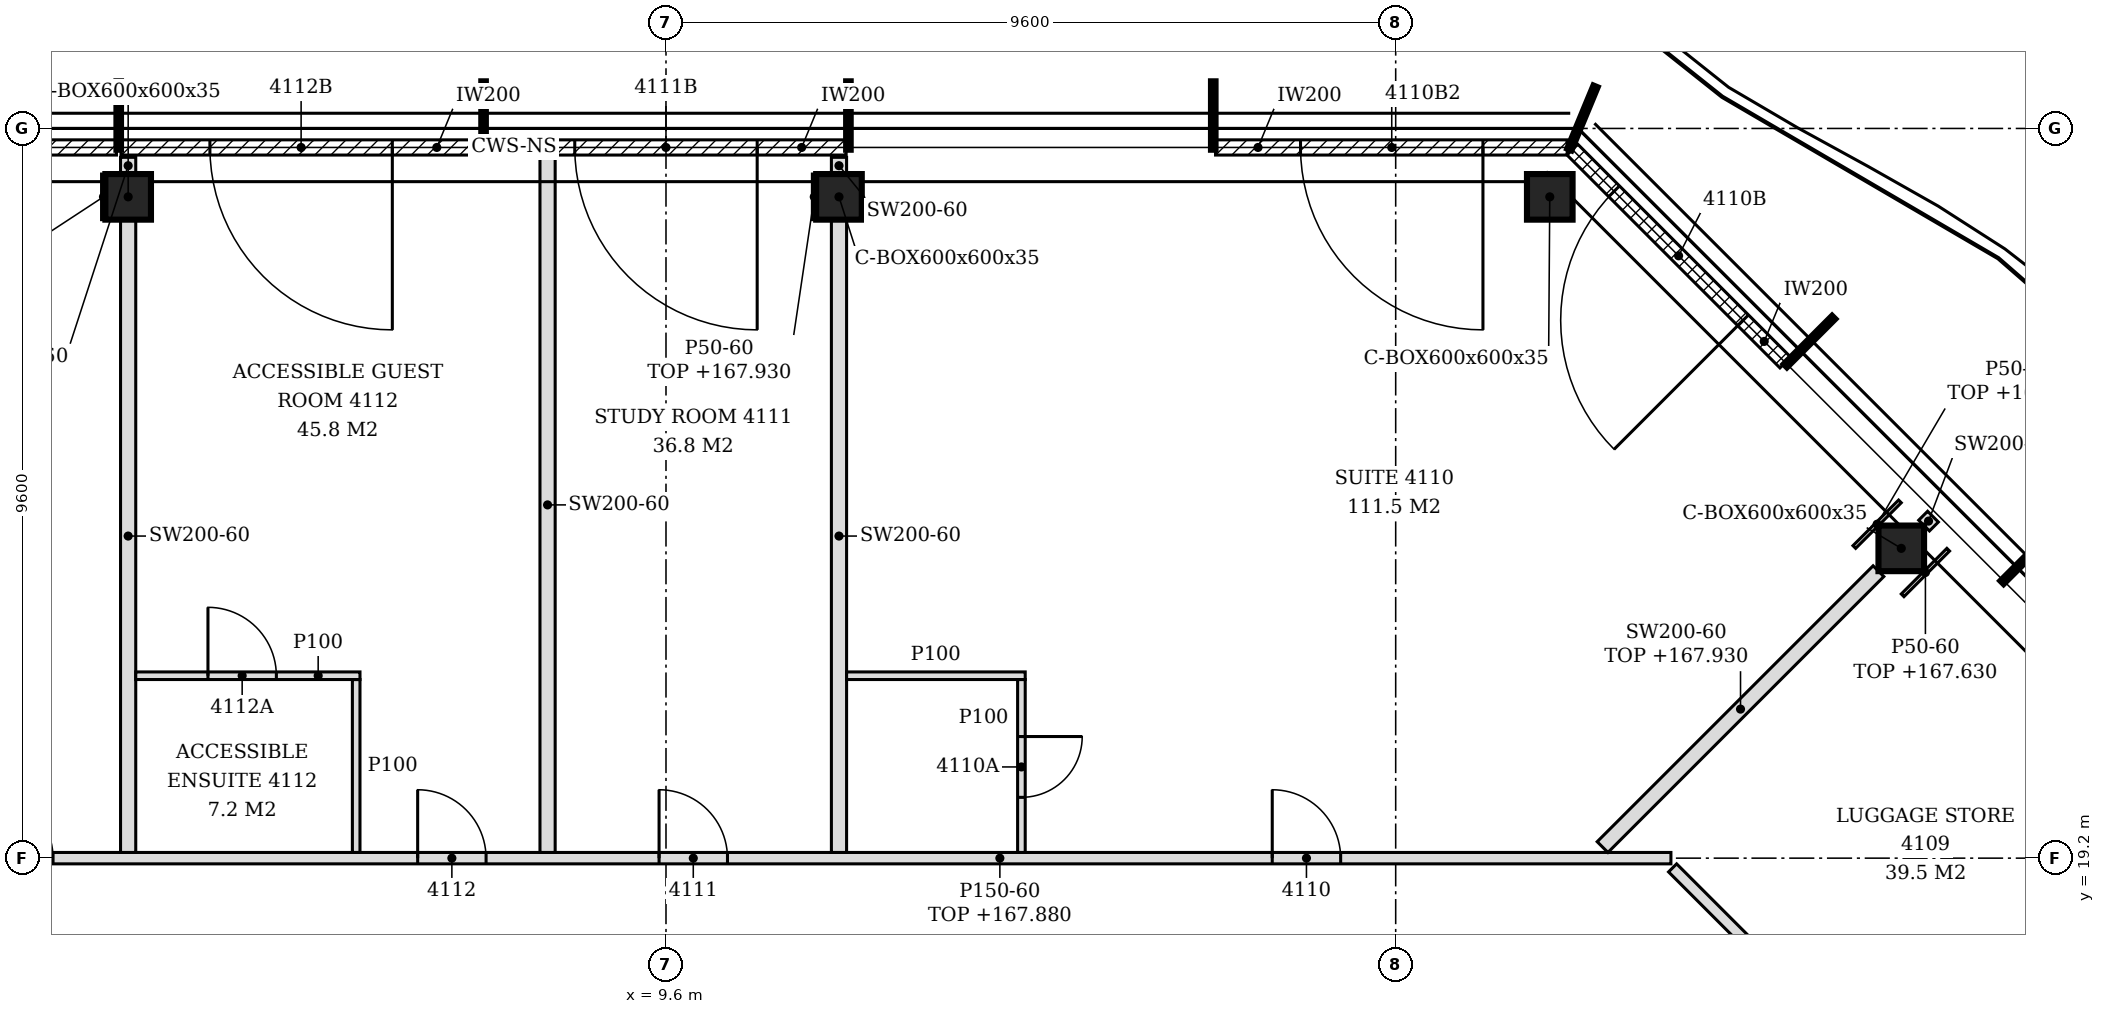
"""IFC4 building model, lengths in metres.
Left out: names, types, materials, properties, quantities, classifications, styles, units other than length and angle.
Written with IfcOpenShell. Run it as: python <this file> out.ifc"""

import sys

from ifc_helpers import new_model, si_unit, direction, frame, frame_2d, origin, origin_2d, place, context, subcontext, project, spatial, polyline, rectangle, hollow_rectangle, outline, extrude, element, fill, save


model = new_model("IFC4")
c1 = context("Model", 3, precision=1e-05, world=origin(), true_north=direction((0.0, 1.0)))
c2 = subcontext(c1, "Body", "Model", "MODEL_VIEW")
j1 = project(units=[si_unit("LENGTHUNIT", "METRE"), si_unit("PLANEANGLEUNIT", "RADIAN")], contexts=[c1])
p1 = place(None, origin())
s1 = spatial("IfcSite", under=j1, at=p1, CompositionType="ELEMENT")
p2 = place(p1, origin())
s2 = spatial("IfcBuilding", under=s1, at=p2, CompositionType="ELEMENT")
p3 = place(p2, frame((0.0, 0.0, 165.0)))
s3 = spatial("IfcBuildingStorey", under=s2, at=p3, CompositionType="ELEMENT", Elevation=165.0)
for number, where, z_axis, x_axis in (
    (1, (25.852, 23.276, -0.15), (0.0, 0.0, 1.0), (1.0, 0.0, 0.0)),
    (2, (21.227, 27.9, -0.15), (0.0, 0.0, 1.0), (1.0, 0.0, 0.0)),
    (3, (11.876, 27.9, -0.15), (0.0, 0.0, 1.0), (1.0, 0.0, 0.0)),
    (4, (2.524, 27.9, -0.15), (0.0, 0.0, 1.0), (1.0, 0.0, 0.0)),
):
    element("IfcColumn", number, at=place(p3, frame(where, z_axis=z_axis, x_axis=x_axis)), inside=s3, PredefinedType="COLUMN", context=c2, shape_type="SweptSolid", body=[
        extrude(hollow_rectangle(XDim=0.6, YDim=0.6, WallThickness=0.035, at=origin_2d()), origin(), (0.0, 0.0, 1.0), 3.6),
    ])
p4 = place(p3, frame((24.326, 25.72, 0.0), z_axis=(0.0, 0.0, 1.0), x_axis=(-0.707106781187, 0.707106781187, 0.0)))
e5 = element("IfcWall", 5, at=p4, inside=s3, PredefinedType="NOTDEFINED", context=c2, shape_type="SweptSolid", body=[
    extrude(rectangle(XDim=3.962, YDim=0.2, at=frame_2d((1.981, 0.0))), origin(), (0.0, 0.0, 1.0), 3.45),
])
p5 = place(p4, frame((0.786, 0.0, 0.0)))
e6 = element("IfcOpeningElement", 6, at=p5, cuts=e5, PredefinedType="OPENING", context=c2, shape_type="SweptSolid", body=[
    extrude(rectangle(XDim=2.4, YDim=2.4, at=frame_2d((1.2, 1.2))), frame((0.0, 0.11, 0.0), z_axis=(0.0, -1.0, 0.0), x_axis=(1.0, 0.0, 0.0)), (0.0, 0.0, 1.0), 0.22),
])
p6 = place(p3, frame((21.457, 28.55, 0.0), z_axis=(0.0, 0.0, 1.0), x_axis=(-1.0, 0.0, 0.0)))
e7 = element("IfcWall", 7, at=p6, inside=s3, PredefinedType="NOTDEFINED", context=c2, shape_type="SweptSolid", body=[
    extrude(rectangle(XDim=4.626, YDim=0.2, at=frame_2d((2.313, 0.0))), origin(), (0.0, 0.0, 1.0), 3.45),
])
p7 = place(p6, frame((1.108, 0.0, 0.0)))
e8 = element("IfcOpeningElement", 8, at=p7, cuts=e7, PredefinedType="OPENING", context=c2, shape_type="SweptSolid", body=[
    extrude(rectangle(XDim=2.4, YDim=2.4, at=frame_2d((1.2, 1.2))), frame((0.0, 0.11, 0.0), z_axis=(0.0, -1.0, 0.0), x_axis=(1.0, 0.0, 0.0)), (0.0, 0.0, 1.0), 0.22),
])
p8 = place(p3, frame((11.97, 28.55, 0.0), z_axis=(0.0, 0.0, 1.0), x_axis=(-1.0, 0.0, 0.0)))
e9 = element("IfcWall", 9, at=p8, inside=s3, PredefinedType="NOTDEFINED", context=c2, shape_type="SweptSolid", body=[
    extrude(rectangle(XDim=4.74, YDim=0.2, at=frame_2d((2.37, 0.0))), origin(), (0.0, 0.0, 1.0), 3.45),
])
p9 = place(p8, frame((1.17, 0.0, 0.0)))
e10 = element("IfcOpeningElement", 10, at=p9, cuts=e9, PredefinedType="OPENING", context=c2, shape_type="SweptSolid", body=[
    extrude(rectangle(XDim=2.4, YDim=2.4, at=frame_2d((1.2, 1.2))), frame((0.0, 0.11, 0.0), z_axis=(0.0, -1.0, 0.0), x_axis=(1.0, 0.0, 0.0)), (0.0, 0.0, 1.0), 0.22),
])
p10 = place(p3, frame((7.17, 28.55, 0.0), z_axis=(0.0, 0.0, 1.0), x_axis=(-1.0, 0.0, 0.0)))
e11 = element("IfcWall", 11, at=p10, inside=s3, PredefinedType="NOTDEFINED", context=c2, shape_type="SweptSolid", body=[
    extrude(rectangle(XDim=4.74, YDim=0.2, at=frame_2d((2.37, 0.0))), origin(), (0.0, 0.0, 1.0), 3.45),
])
p11 = place(p10, frame((1.17, 0.0, 0.0)))
e12 = element("IfcOpeningElement", 12, at=p11, cuts=e11, PredefinedType="OPENING", context=c2, shape_type="SweptSolid", body=[
    extrude(rectangle(XDim=2.4, YDim=2.4, at=frame_2d((1.2, 1.2))), frame((0.0, 0.11, 0.0), z_axis=(0.0, -1.0, 0.0), x_axis=(1.0, 0.0, 0.0)), (0.0, 0.0, 1.0), 0.22),
])
p12 = place(p3, frame((2.37, 28.55, 0.0), z_axis=(0.0, 0.0, 1.0), x_axis=(-1.0, 0.0, 0.0)))
e13 = element("IfcWall", 13, at=p12, inside=s3, PredefinedType="NOTDEFINED", context=c2, shape_type="SweptSolid", body=[
    extrude(rectangle(XDim=4.74, YDim=0.2, at=frame_2d((2.37, 0.0))), origin(), (0.0, 0.0, 1.0), 3.45),
])
p13 = place(p12, frame((1.17, 0.0, 0.0)))
e14 = element("IfcOpeningElement", 14, at=p13, cuts=e13, PredefinedType="OPENING", context=c2, shape_type="SweptSolid", body=[
    extrude(rectangle(XDim=2.4, YDim=2.4, at=frame_2d((1.2, 1.2))), frame((0.0, 0.11, 0.0), z_axis=(0.0, -1.0, 0.0), x_axis=(1.0, 0.0, 0.0)), (0.0, 0.0, 1.0), 0.22),
])
p14 = place(p3, frame((26.869, 15.045, 0.0), z_axis=(0.0, 0.0, 1.0), x_axis=(-0.706999586952, 0.707213959174, 0.0)))
e15 = element("IfcWall", 15, at=p14, inside=s3, PredefinedType="PARTITIONING", context=c2, shape_type="SweptSolid", body=[
    extrude(rectangle(XDim=5.694, YDim=0.15, at=frame_2d((2.847, 0.0))), origin(), (0.0, 0.0, 1.0), 2.93),
])
p15 = place(p14, frame((2.487, 0.0, 0.0)))
e16 = element("IfcOpeningElement", 16, at=p15, cuts=e15, PredefinedType="OPENING", context=c2, shape_type="SweptSolid", body=[
    extrude(rectangle(XDim=0.9, YDim=2.1, at=frame_2d((0.45, 1.05))), frame((0.0, 0.085, 0.0), z_axis=(0.0, -1.0, 0.0), x_axis=(1.0, 0.0, 0.0)), (0.0, 0.0, 1.0), 0.17),
])
p16 = place(p3, frame((-8.421, 19.2, 0.0), z_axis=(0.0, 0.0, 1.0), x_axis=(1.0, 0.0, 0.0)))
e17 = element("IfcWall", 17, at=p16, inside=s3, PredefinedType="PARTITIONING", context=c2, shape_type="SweptSolid", body=[
    extrude(outline(polyline([(0.0, 0.0), (31.242, 0.0), (31.242, 2.88), (27.771, 2.88), (27.769, 2.73), (27.471, 2.73), (27.469, 2.88), (15.771, 2.88), (15.769, 2.73), (15.471, 2.73), (15.469, 2.88), (3.771, 2.88), (3.769, 2.73), (3.471, 2.73), (3.469, 2.88), (0.0, 2.88), (0.0, 0.0)])), frame((0.0, 0.075, 0.0), z_axis=(0.0, -1.0, 0.0), x_axis=(1.0, 0.0, 0.0)), (0.0, 0.0, 1.0), 0.15),
])
p17 = place(p16, frame((25.997, 0.0, 0.0)))
e18 = element("IfcOpeningElement", 18, at=p17, cuts=e17, PredefinedType="OPENING", context=c2, shape_type="SweptSolid", body=[
    extrude(rectangle(XDim=0.9, YDim=2.1, at=frame_2d((0.45, 1.05))), frame((0.0, 0.085, 0.0), z_axis=(0.0, -1.0, 0.0), x_axis=(1.0, 0.0, 0.0)), (0.0, 0.0, 1.0), 0.17),
])
p18 = place(p16, frame((17.93, 0.0, 0.0)))
e19 = element("IfcOpeningElement", 19, at=p18, cuts=e17, PredefinedType="OPENING", context=c2, shape_type="SweptSolid", body=[
    extrude(rectangle(XDim=0.9, YDim=2.1, at=frame_2d((0.45, 1.05))), frame((0.0, 0.085, 0.0), z_axis=(0.0, -1.0, 0.0), x_axis=(1.0, 0.0, 0.0)), (0.0, 0.0, 1.0), 0.17),
])
p19 = place(p16, frame((14.754, 0.0, 0.0)))
e20 = element("IfcOpeningElement", 20, at=p19, cuts=e17, PredefinedType="OPENING", context=c2, shape_type="SweptSolid", body=[
    extrude(rectangle(XDim=0.9, YDim=2.1, at=frame_2d((0.45, 1.05))), frame((0.0, 0.085, 0.0), z_axis=(0.0, -1.0, 0.0), x_axis=(1.0, 0.0, 0.0)), (0.0, 0.0, 1.0), 0.17),
])
p20 = place(p16, frame((9.057, 0.0, 0.0)))
e21 = element("IfcOpeningElement", 21, at=p20, cuts=e17, PredefinedType="OPENING", context=c2, shape_type="SweptSolid", body=[
    extrude(rectangle(XDim=0.9, YDim=2.1, at=frame_2d((0.45, 1.05))), frame((0.0, 0.085, 0.0), z_axis=(0.0, -1.0, 0.0), x_axis=(1.0, 0.0, 0.0)), (0.0, 0.0, 1.0), 0.17),
])
p21 = place(p16, frame((2.907, 0.0, 0.0)))
e22 = element("IfcOpeningElement", 22, at=p21, cuts=e17, PredefinedType="OPENING", context=c2, shape_type="SweptSolid", body=[
    extrude(rectangle(XDim=0.9, YDim=2.1, at=frame_2d((0.45, 1.05))), frame((0.0, 0.085, 0.0), z_axis=(0.0, -1.0, 0.0), x_axis=(1.0, 0.0, 0.0)), (0.0, 0.0, 1.0), 0.17),
])
p22 = place(p3, frame((2.524, 19.275, 0.0), z_axis=(0.0, 0.0, 1.0), x_axis=(0.0, 1.0, 0.0)))
e23 = element("IfcWall", 23, at=p22, inside=s3, PredefinedType="PARTITIONING", context=c2, shape_type="SweptSolid", body=[
    extrude(outline(polyline([(0.0, 0.0), (8.325, 0.0), (8.325, 3.45), (4.83, 3.45), (4.828, 2.88), (4.62, 2.88), (4.618, 3.45), (0.03, 3.45), (0.028, 2.88), (0.0, 2.88), (0.0, 0.0)])), frame((0.0, 0.1, 0.0), z_axis=(0.0, -1.0, 0.0), x_axis=(1.0, 0.0, 0.0)), (0.0, 0.0, 1.0), 0.2),
])
p23 = place(p3, frame((5.524, 19.275, 0.0), z_axis=(0.0, 0.0, 1.0), x_axis=(0.0, 1.0, 0.0)))
e24 = element("IfcWall", 24, at=p23, inside=s3, PredefinedType="PARTITIONING", context=c2, shape_type="SweptSolid", body=[
    extrude(outline(polyline([(0.0, 0.0), (2.275, 0.0), (2.275, 3.45), (0.03, 3.45), (0.028, 2.88), (0.0, 2.88), (0.0, 0.0)])), frame((0.0, 0.05, 0.0), z_axis=(0.0, -1.0, 0.0), x_axis=(1.0, 0.0, 0.0)), (0.0, 0.0, 1.0), 0.1),
])
p24 = place(p3, frame((8.042, 19.275, 0.0), z_axis=(0.0, 0.0, 1.0), x_axis=(0.0, 1.0, 0.0)))
e25 = element("IfcWall", 25, at=p24, inside=s3, PredefinedType="PARTITIONING", context=c2, shape_type="SweptSolid", body=[
    extrude(outline(polyline([(0.0, 0.0), (9.145, 0.0), (9.145, 3.45), (8.775, 3.45), (8.773, 2.93), (8.475, 2.93), (8.473, 3.45), (4.83, 3.45), (4.828, 2.88), (4.62, 2.88), (4.618, 3.45), (0.03, 3.45), (0.028, 2.88), (0.0, 2.88), (0.0, 0.0)])), frame((0.0, 0.1, 0.0), z_axis=(0.0, -1.0, 0.0), x_axis=(1.0, 0.0, 0.0)), (0.0, 0.0, 1.0), 0.2),
])
p25 = place(p3, frame((11.876, 19.275, 0.0), z_axis=(0.0, 0.0, 1.0), x_axis=(0.0, 1.0, 0.0)))
e26 = element("IfcWall", 26, at=p25, inside=s3, PredefinedType="PARTITIONING", context=c2, shape_type="SweptSolid", body=[
    extrude(outline(polyline([(0.0, 0.0), (8.325, 0.0), (8.325, 3.45), (4.83, 3.45), (4.828, 2.88), (4.62, 2.88), (4.618, 3.45), (0.03, 3.45), (0.028, 2.88), (0.0, 2.88), (0.0, 0.0)])), frame((0.0, 0.1, 0.0), z_axis=(0.0, -1.0, 0.0), x_axis=(1.0, 0.0, 0.0)), (0.0, 0.0, 1.0), 0.2),
])
p26 = place(p3, frame((14.276, 19.275, 0.0), z_axis=(0.0, 0.0, 1.0), x_axis=(0.0, 1.0, 0.0)))
e27 = element("IfcWall", 27, at=p26, inside=s3, PredefinedType="PARTITIONING", context=c2, shape_type="SweptSolid", body=[
    extrude(outline(polyline([(0.0, 0.0), (2.275, 0.0), (2.275, 3.45), (0.03, 3.45), (0.028, 2.88), (0.0, 2.88), (0.0, 0.0)])), frame((0.0, 0.05, 0.0), z_axis=(0.0, -1.0, 0.0), x_axis=(1.0, 0.0, 0.0)), (0.0, 0.0, 1.0), 0.1),
])
p27 = place(p26, frame((0.725, 0.0, 0.0)))
e28 = element("IfcOpeningElement", 28, at=p27, cuts=e27, PredefinedType="OPENING", context=c2, shape_type="SweptSolid", body=[
    extrude(rectangle(XDim=0.8, YDim=2.1, at=frame_2d((0.4, 1.05))), frame((0.0, 0.06, 0.0), z_axis=(0.0, -1.0, 0.0), x_axis=(1.0, 0.0, 0.0)), (0.0, 0.0, 1.0), 0.12),
])
p28 = place(p3, frame((21.922, 19.346, 0.0), z_axis=(0.0, 0.0, 1.0), x_axis=(0.707106781187, 0.707106781187, 0.0)))
e29 = element("IfcWall", 29, at=p28, inside=s3, PredefinedType="PARTITIONING", context=c2, shape_type="SweptSolid", body=[
    extrude(rectangle(XDim=5.134, YDim=0.2, at=frame_2d((2.567, 0.0))), origin(), (0.0, 0.0, 1.0), 2.93),
])
p29 = place(p3, frame((2.624, 21.6, 0.0), z_axis=(0.0, 0.0, 1.0), x_axis=(1.0, 0.0, 0.0)))
e30 = element("IfcWall", 30, at=p29, inside=s3, PredefinedType="PARTITIONING", context=c2, shape_type="SweptSolid", body=[
    extrude(rectangle(XDim=2.95, YDim=0.1, at=frame_2d((1.475, 0.0))), origin(), (0.0, 0.0, 1.0), 3.45),
])
p30 = place(p29, frame((0.95, 0.0, 0.0)))
e31 = element("IfcOpeningElement", 31, at=p30, cuts=e30, PredefinedType="OPENING", context=c2, shape_type="SweptSolid", body=[
    extrude(rectangle(XDim=0.9, YDim=2.1, at=frame_2d((0.45, 1.05))), frame((0.0, 0.06, 0.0), z_axis=(0.0, -1.0, 0.0), x_axis=(1.0, 0.0, 0.0)), (0.0, 0.0, 1.0), 0.12),
])
p31 = place(p3, frame((11.976, 21.6, 0.0), z_axis=(0.0, 0.0, 1.0), x_axis=(1.0, 0.0, 0.0)))
e32 = element("IfcWall", 32, at=p31, inside=s3, PredefinedType="PARTITIONING", context=c2, shape_type="SweptSolid", body=[
    extrude(rectangle(XDim=2.35, YDim=0.1, at=frame_2d((1.175, 0.0))), origin(), (0.0, 0.0, 1.0), 3.45),
])
p32 = place(p3, frame((26.152, 23.576, 0.0), z_axis=(0.0, 0.0, 1.0), x_axis=(0.707106781187, 0.707106781187, 0.0)))
e33 = element("IfcWall", 33, at=p32, inside=s3, PredefinedType="PARTITIONING", context=c2, shape_type="SweptSolid", body=[
    extrude(rectangle(XDim=0.166, YDim=0.2, at=frame_2d((0.083, 0.0))), origin(), (0.0, 0.0, 1.0), 3.45),
])
for number, where, z_axis, x_axis in (
    (34, (2.524, 28.2, 0.0), (0.0, 0.0, 1.0), (0.0, 1.0, 0.0)),
    (35, (11.876, 28.2, 0.0), (0.0, 0.0, 1.0), (0.0, 1.0, 0.0)),
):
    element("IfcWall", number, at=place(p3, frame(where, z_axis=z_axis, x_axis=x_axis)), inside=s3, PredefinedType="PARTITIONING", context=c2, shape_type="SweptSolid", body=[
        extrude(rectangle(XDim=0.22, YDim=0.2, at=frame_2d((0.11, 0.0))), origin(), (0.0, 0.0, 1.0), 3.45),
    ])
for number, where, z_axis, x_axis in (
    (36, (2.199, 27.6, 0.0), (0.0, 0.0, 1.0), (0.0, 1.0, 0.0)),
    (37, (11.551, 27.6, 0.0), (0.0, 0.0, 1.0), (0.0, 1.0, 0.0)),
):
    element("IfcWall", number, at=place(p3, frame(where, z_axis=z_axis, x_axis=x_axis)), inside=s3, PredefinedType="PARTITIONING", context=c2, shape_type="SweptSolid", body=[
        extrude(rectangle(XDim=0.6, YDim=0.05, at=frame_2d((0.3, 0.0))), origin(), (0.0, 0.0, 1.0), 2.93),
    ])
p33 = place(p3, frame((25.234, 23.293, 0.0), z_axis=(0.0, 0.0, 1.0), x_axis=(0.707106781187, 0.707106781187, 0.0)))
e38 = element("IfcWall", 38, at=p33, inside=s3, PredefinedType="PARTITIONING", context=c2, shape_type="SweptSolid", body=[
    extrude(rectangle(XDim=0.848, YDim=0.05, at=frame_2d((0.424, 0.0))), origin(), (0.0, 0.0, 1.0), 2.93),
])
p34 = place(p3, frame((25.869, 22.658, 0.0), z_axis=(0.0, 0.0, 1.0), x_axis=(0.707106781187, 0.707106781187, 0.0)))
e39 = element("IfcWall", 39, at=p34, inside=s3, PredefinedType="PARTITIONING", context=c2, shape_type="SweptSolid", body=[
    extrude(rectangle(XDim=0.849, YDim=0.05, at=frame_2d((0.424, 0.0))), origin(), (0.0, 0.0, 1.0), 2.63),
])
p35 = place(p5, origin())
e40 = element("IfcDoor", 40, at=p35, inside=s3, OperationType="SINGLE_SWING_LEFT", PredefinedType="DOOR", context=c2, shape_type="SweptSolid", body=[
    extrude(rectangle(XDim=2.4, YDim=2.4, at=frame_2d((1.2, 1.2))), frame((0.0, 0.025, 0.0), z_axis=(0.0, -1.0, 0.0), x_axis=(1.0, 0.0, 0.0)), (0.0, 0.0, 1.0), 0.05),
])
fill(e6, e40)
p36 = place(p7, origin())
e41 = element("IfcDoor", 41, at=p36, inside=s3, OperationType="SINGLE_SWING_LEFT", PredefinedType="DOOR", context=c2, shape_type="SweptSolid", body=[
    extrude(rectangle(XDim=2.4, YDim=2.4, at=frame_2d((1.2, 1.2))), frame((0.0, 0.025, 0.0), z_axis=(0.0, -1.0, 0.0), x_axis=(1.0, 0.0, 0.0)), (0.0, 0.0, 1.0), 0.05),
])
fill(e8, e41)
p37 = place(p9, origin())
e42 = element("IfcDoor", 42, at=p37, inside=s3, OperationType="SINGLE_SWING_LEFT", PredefinedType="DOOR", context=c2, shape_type="SweptSolid", body=[
    extrude(rectangle(XDim=2.4, YDim=2.4, at=frame_2d((1.2, 1.2))), frame((0.0, 0.025, 0.0), z_axis=(0.0, -1.0, 0.0), x_axis=(1.0, 0.0, 0.0)), (0.0, 0.0, 1.0), 0.05),
])
fill(e10, e42)
p38 = place(p11, origin())
e43 = element("IfcDoor", 43, at=p38, inside=s3, OperationType="SINGLE_SWING_LEFT", PredefinedType="DOOR", context=c2, shape_type="SweptSolid", body=[
    extrude(rectangle(XDim=2.4, YDim=2.4, at=frame_2d((1.2, 1.2))), frame((0.0, 0.025, 0.0), z_axis=(0.0, -1.0, 0.0), x_axis=(1.0, 0.0, 0.0)), (0.0, 0.0, 1.0), 0.05),
])
fill(e12, e43)
p39 = place(p17, origin())
e44 = element("IfcDoor", 44, at=p39, inside=s3, OperationType="SINGLE_SWING_LEFT", PredefinedType="DOOR", context=c2, shape_type="SweptSolid", body=[
    extrude(rectangle(XDim=0.9, YDim=2.1, at=frame_2d((0.45, 1.05))), frame((0.0, 0.025, 0.0), z_axis=(0.0, -1.0, 0.0), x_axis=(1.0, 0.0, 0.0)), (0.0, 0.0, 1.0), 0.05),
])
fill(e18, e44)
p40 = place(p27, frame((0.8, 0.0, 0.0), z_axis=(0.0, 0.0, 1.0), x_axis=(-1.0, 0.0, 0.0)))
e45 = element("IfcDoor", 45, at=p40, inside=s3, OperationType="SINGLE_SWING_LEFT", PredefinedType="DOOR", context=c2, shape_type="SweptSolid", body=[
    extrude(rectangle(XDim=0.8, YDim=2.1, at=frame_2d((0.4, 1.05))), frame((0.0, 0.025, 0.0), z_axis=(0.0, -1.0, 0.0), x_axis=(1.0, 0.0, 0.0)), (0.0, 0.0, 1.0), 0.05),
])
fill(e28, e45)
p41 = place(p18, origin())
e46 = element("IfcDoor", 46, at=p41, inside=s3, OperationType="SINGLE_SWING_LEFT", PredefinedType="DOOR", context=c2, shape_type="SweptSolid", body=[
    extrude(rectangle(XDim=0.9, YDim=2.1, at=frame_2d((0.45, 1.05))), frame((0.0, 0.025, 0.0), z_axis=(0.0, -1.0, 0.0), x_axis=(1.0, 0.0, 0.0)), (0.0, 0.0, 1.0), 0.05),
])
fill(e19, e46)
p42 = place(p19, origin())
e47 = element("IfcDoor", 47, at=p42, inside=s3, OperationType="SINGLE_SWING_LEFT", PredefinedType="DOOR", context=c2, shape_type="SweptSolid", body=[
    extrude(rectangle(XDim=0.9, YDim=2.1, at=frame_2d((0.45, 1.05))), frame((0.0, 0.025, 0.0), z_axis=(0.0, -1.0, 0.0), x_axis=(1.0, 0.0, 0.0)), (0.0, 0.0, 1.0), 0.05),
])
fill(e20, e47)
p43 = place(p30, origin())
e48 = element("IfcDoor", 48, at=p43, inside=s3, OperationType="SINGLE_SWING_LEFT", PredefinedType="DOOR", context=c2, shape_type="SweptSolid", body=[
    extrude(rectangle(XDim=0.9, YDim=2.1, at=frame_2d((0.45, 1.05))), frame((0.0, 0.025, 0.0), z_axis=(0.0, -1.0, 0.0), x_axis=(1.0, 0.0, 0.0)), (0.0, 0.0, 1.0), 0.05),
])
fill(e31, e48)
p44 = place(p20, origin())
e49 = element("IfcDoor", 49, at=p44, inside=s3, OperationType="SINGLE_SWING_LEFT", PredefinedType="DOOR", context=c2, shape_type="SweptSolid", body=[
    extrude(rectangle(XDim=0.9, YDim=2.1, at=frame_2d((0.45, 1.05))), frame((0.0, 0.025, 0.0), z_axis=(0.0, -1.0, 0.0), x_axis=(1.0, 0.0, 0.0)), (0.0, 0.0, 1.0), 0.05),
])
fill(e21, e49)
save(model, sys.argv[1])
